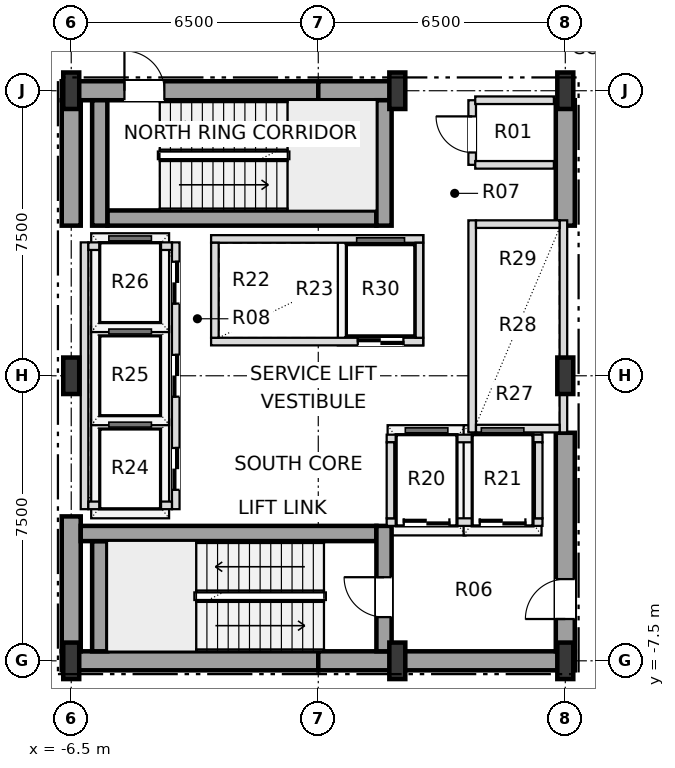
"""IFC4 building model, lengths in metres.
Left out: names, types, materials, properties, quantities, classifications, styles, units other than length and angle.
Written with IfcOpenShell. Run it as: python <this file> out.ifc"""

import sys

from ifc_helpers import new_model, si_unit, direction, frame, frame_2d, origin, origin_2d, place, context, subcontext, project, spatial, rectangle, i_section, extrude, element, fill, save


model = new_model("IFC4")
c1 = context("Model", 3, precision=1e-05, world=origin(), true_north=direction((0.0, 1.0)))
c2 = subcontext(c1, "Body", "Model", "MODEL_VIEW")
j1 = project(units=[si_unit("LENGTHUNIT", "METRE"), si_unit("PLANEANGLEUNIT", "RADIAN")], contexts=[c1])
p1 = place(None, origin())
s1 = spatial("IfcSite", under=j1, at=p1, CompositionType="ELEMENT")
p2 = place(p1, origin())
s2 = spatial("IfcBuilding", under=s1, at=p2, CompositionType="ELEMENT")
p3 = place(p2, frame((0.0, 0.0, 27.6)))
s3 = spatial("IfcBuildingStorey", under=s2, at=p3, CompositionType="ELEMENT", Elevation=27.6)
for number, where, z_axis, x_axis in (
    (1, (-6.5, -7.5, 0.0), (0.0, 0.0, 1.0), (1.0, 0.0, 0.0)),
    (2, (2.08, -7.5, 0.0), (0.0, 0.0, 1.0), (1.0, 0.0, 0.0)),
    (3, (6.5, -7.5, 0.0), (0.0, 0.0, 1.0), (1.0, 0.0, 0.0)),
    (4, (-6.5, 0.0, 0.0), (0.0, 0.0, 1.0), (1.0, 0.0, 0.0)),
    (5, (6.5, 0.0, 0.0), (0.0, 0.0, 1.0), (1.0, 0.0, 0.0)),
    (6, (-6.5, 7.5, 0.0), (0.0, 0.0, 1.0), (1.0, 0.0, 0.0)),
    (7, (2.08, 7.5, 0.0), (0.0, 0.0, 1.0), (1.0, 0.0, 0.0)),
    (8, (6.5, 7.5, 0.0), (0.0, 0.0, 1.0), (1.0, 0.0, 0.0)),
):
    element("IfcColumn", number, at=place(p3, frame(where, z_axis=z_axis, x_axis=x_axis)), inside=s3, PredefinedType="COLUMN", context=c2, shape_type="SweptSolid", body=[
        extrude(i_section(OverallWidth=0.42, OverallDepth=0.96, WebThickness=0.022, FlangeThickness=0.034, at=origin_2d()), origin(), (0.0, 0.0, 1.0), 4.8),
    ])
for number, where, z_axis, x_axis in (
    (9, (-6.75, -7.5, 0.0), (0.0, 0.0, 1.0), (1.0, 0.0, 0.0)),
    (10, (0.0, -7.5, 0.0), (0.0, 0.0, 1.0), (1.0, 0.0, 0.0)),
):
    element("IfcWall", number, at=place(p3, frame(where, z_axis=z_axis, x_axis=x_axis)), inside=s3, PredefinedType="SHEAR", context=c2, shape_type="SweptSolid", body=[
        extrude(rectangle(XDim=6.75, YDim=0.5, at=frame_2d((3.375, 0.0))), origin(), (0.0, 0.0, 1.0), 4.58),
    ])
p4 = place(p3, frame((-6.75, 7.5, 0.0), z_axis=(0.0, 0.0, 1.0), x_axis=(1.0, 0.0, 0.0)))
e11 = element("IfcWall", 11, at=p4, inside=s3, PredefinedType="SHEAR", context=c2, shape_type="SweptSolid", body=[
    extrude(rectangle(XDim=6.75, YDim=0.5, at=frame_2d((3.375, 0.0))), origin(), (0.0, 0.0, 1.0), 4.58),
])
p5 = place(p4, frame((1.65, 0.0, 0.0)))
e12 = element("IfcOpeningElement", 12, at=p5, cuts=e11, PredefinedType="OPENING", context=c2, shape_type="SweptSolid", body=[
    extrude(rectangle(XDim=1.05, YDim=2.15, at=frame_2d((0.525, 1.075))), frame((0.0, 0.26, 0.0), z_axis=(0.0, -1.0, 0.0), x_axis=(1.0, 0.0, 0.0)), (0.0, 0.0, 1.0), 0.52),
])
p6 = place(p3, frame((0.0, 7.5, 0.0), z_axis=(0.0, 0.0, 1.0), x_axis=(1.0, 0.0, 0.0)))
e13 = element("IfcWall", 13, at=p6, inside=s3, PredefinedType="SHEAR", context=c2, shape_type="SweptSolid", body=[
    extrude(rectangle(XDim=2.08, YDim=0.5, at=frame_2d((1.04, 0.0))), origin(), (0.0, 0.0, 1.0), 4.58),
])
p7 = place(p3, frame((-6.5, -7.25, 0.0), z_axis=(0.0, 0.0, 1.0), x_axis=(0.0, 1.0, 0.0)))
e14 = element("IfcWall", 14, at=p7, inside=s3, PredefinedType="SHEAR", context=c2, shape_type="SweptSolid", body=[
    extrude(rectangle(XDim=3.55, YDim=0.5, at=frame_2d((1.775, 0.0))), origin(), (0.0, 0.0, 1.0), 4.58),
])
p8 = place(p3, frame((-6.5, 3.95, 0.0), z_axis=(0.0, 0.0, 1.0), x_axis=(0.0, 1.0, 0.0)))
e15 = element("IfcWall", 15, at=p8, inside=s3, PredefinedType="SHEAR", context=c2, shape_type="SweptSolid", body=[
    extrude(rectangle(XDim=3.3, YDim=0.5, at=frame_2d((1.65, 0.0))), origin(), (0.0, 0.0, 1.0), 4.58),
])
p9 = place(p3, frame((6.5, -7.25, 0.0), z_axis=(0.0, 0.0, 1.0), x_axis=(0.0, 1.0, 0.0)))
e16 = element("IfcWall", 16, at=p9, inside=s3, PredefinedType="SHEAR", context=c2, shape_type="SweptSolid", body=[
    extrude(rectangle(XDim=5.75, YDim=0.5, at=frame_2d((2.875, 0.0))), origin(), (0.0, 0.0, 1.0), 4.58),
])
p10 = place(p9, frame((0.85, 0.0, 0.0)))
e17 = element("IfcOpeningElement", 17, at=p10, cuts=e16, PredefinedType="OPENING", context=c2, shape_type="SweptSolid", body=[
    extrude(rectangle(XDim=1.05, YDim=2.15, at=frame_2d((0.525, 1.075))), frame((0.0, 0.26, 0.0), z_axis=(0.0, -1.0, 0.0), x_axis=(1.0, 0.0, 0.0)), (0.0, 0.0, 1.0), 0.52),
])
p11 = place(p3, frame((6.5, 3.95, 0.0), z_axis=(0.0, 0.0, 1.0), x_axis=(0.0, 1.0, 0.0)))
e18 = element("IfcWall", 18, at=p11, inside=s3, PredefinedType="SHEAR", context=c2, shape_type="SweptSolid", body=[
    extrude(rectangle(XDim=3.3, YDim=0.5, at=frame_2d((1.65, 0.0))), origin(), (0.0, 0.0, 1.0), 4.58),
])
p12 = place(p3, frame((-5.75, -7.25, 0.0), z_axis=(0.0, 0.0, 1.0), x_axis=(0.0, 1.0, 0.0)))
e19 = element("IfcWall", 19, at=p12, inside=s3, PredefinedType="SHEAR", context=c2, shape_type="SweptSolid", body=[
    extrude(rectangle(XDim=2.9, YDim=0.4, at=frame_2d((1.45, 0.0))), origin(), (0.0, 0.0, 1.0), 4.58),
])
p13 = place(p3, frame((-6.25, -4.15, 0.0), z_axis=(0.0, 0.0, 1.0), x_axis=(1.0, 0.0, 0.0)))
e20 = element("IfcWall", 20, at=p13, inside=s3, PredefinedType="SHEAR", context=c2, shape_type="SweptSolid", body=[
    extrude(rectangle(XDim=7.78, YDim=0.4, at=frame_2d((3.89, 0.0))), origin(), (0.0, 0.0, 1.0), 4.58),
])
p14 = place(p3, frame((1.73, -7.25, 0.0), z_axis=(0.0, 0.0, 1.0), x_axis=(0.0, 1.0, 0.0)))
e21 = element("IfcWall", 21, at=p14, inside=s3, PredefinedType="SHEAR", context=c2, shape_type="SweptSolid", body=[
    extrude(rectangle(XDim=3.3, YDim=0.4, at=frame_2d((1.65, 0.0))), origin(), (0.0, 0.0, 1.0), 4.58),
])
p15 = place(p14, frame((0.9, 0.0, 0.0)))
e22 = element("IfcOpeningElement", 22, at=p15, cuts=e21, PredefinedType="OPENING", context=c2, shape_type="SweptSolid", body=[
    extrude(rectangle(XDim=1.05, YDim=2.15, at=frame_2d((0.525, 1.075))), frame((0.0, 0.21, 0.0), z_axis=(0.0, -1.0, 0.0), x_axis=(1.0, 0.0, 0.0)), (0.0, 0.0, 1.0), 0.42),
])
p16 = place(p3, frame((-5.55, 4.15, 0.0), z_axis=(0.0, 0.0, 1.0), x_axis=(1.0, 0.0, 0.0)))
e23 = element("IfcWall", 23, at=p16, inside=s3, PredefinedType="SHEAR", context=c2, shape_type="SweptSolid", body=[
    extrude(rectangle(XDim=7.08, YDim=0.4, at=frame_2d((3.54, 0.0))), origin(), (0.0, 0.0, 1.0), 4.58),
])
for number, where, z_axis, x_axis in (
    (24, (1.73, 3.95, 0.0), (0.0, 0.0, 1.0), (0.0, 1.0, 0.0)),
    (25, (-5.75, 3.95, 0.0), (0.0, 0.0, 1.0), (0.0, 1.0, 0.0)),
):
    element("IfcWall", number, at=place(p3, frame(where, z_axis=z_axis, x_axis=x_axis)), inside=s3, PredefinedType="SHEAR", context=c2, shape_type="SweptSolid", body=[
        extrude(rectangle(XDim=3.3, YDim=0.4, at=frame_2d((1.65, 0.0))), origin(), (0.0, 0.0, 1.0), 4.58),
    ])
p17 = place(p3, frame((-3.75, -3.51, 0.0), z_axis=(0.0, 0.0, 1.0), x_axis=(0.0, 1.0, 0.0)))
e26 = element("IfcWall", 26, at=p17, inside=s3, PredefinedType="SOLIDWALL", context=c2, shape_type="SweptSolid", body=[
    extrude(rectangle(XDim=7.02, YDim=0.2, at=frame_2d((3.51, 0.0))), origin(), (0.0, 0.0, 1.0), 4.58),
])
p18 = place(p17, frame((0.51, 0.0, 0.0)))
e27 = element("IfcOpeningElement", 27, at=p18, cuts=e26, PredefinedType="OPENING", context=c2, shape_type="SweptSolid", body=[
    extrude(rectangle(XDim=1.1, YDim=2.15, at=frame_2d((0.55, 1.075))), frame((0.0, 0.11, 0.0), z_axis=(0.0, -1.0, 0.0), x_axis=(1.0, 0.0, 0.0)), (0.0, 0.0, 1.0), 0.22),
])
p19 = place(p17, frame((2.96, 0.0, 0.0)))
e28 = element("IfcOpeningElement", 28, at=p19, cuts=e26, PredefinedType="OPENING", context=c2, shape_type="SweptSolid", body=[
    extrude(rectangle(XDim=1.1, YDim=2.15, at=frame_2d((0.55, 1.075))), frame((0.0, 0.11, 0.0), z_axis=(0.0, -1.0, 0.0), x_axis=(1.0, 0.0, 0.0)), (0.0, 0.0, 1.0), 0.22),
])
p20 = place(p17, frame((5.41, 0.0, 0.0)))
e29 = element("IfcOpeningElement", 29, at=p20, cuts=e26, PredefinedType="OPENING", context=c2, shape_type="SweptSolid", body=[
    extrude(rectangle(XDim=1.1, YDim=2.15, at=frame_2d((0.55, 1.075))), frame((0.0, 0.11, 0.0), z_axis=(0.0, -1.0, 0.0), x_axis=(1.0, 0.0, 0.0)), (0.0, 0.0, 1.0), 0.22),
])
p21 = place(p3, frame((-6.15, -3.51, 0.0), z_axis=(0.0, 0.0, 1.0), x_axis=(0.0, 1.0, 0.0)))
e30 = element("IfcWall", 30, at=p21, inside=s3, PredefinedType="SOLIDWALL", context=c2, shape_type="SweptSolid", body=[
    extrude(rectangle(XDim=7.02, YDim=0.2, at=frame_2d((3.51, 0.0))), origin(), (0.0, 0.0, 1.0), 4.58),
])
for number, where, z_axis, x_axis in (
    (31, (-6.05, -3.41, 0.0), (0.0, 0.0, 1.0), (1.0, 0.0, 0.0)),
    (32, (-6.05, 3.41, 0.0), (0.0, 0.0, 1.0), (1.0, 0.0, 0.0)),
):
    element("IfcWall", number, at=place(p3, frame(where, z_axis=z_axis, x_axis=x_axis)), inside=s3, PredefinedType="SOLIDWALL", context=c2, shape_type="SweptSolid", body=[
        extrude(rectangle(XDim=2.2, YDim=0.2, at=frame_2d((1.1, 0.0))), origin(), (0.0, 0.0, 1.0), 4.58),
    ])
p22 = place(p3, frame((4.05, -1.49, 0.0), z_axis=(0.0, 0.0, 1.0), x_axis=(0.0, 1.0, 0.0)))
e33 = element("IfcWall", 33, at=p22, inside=s3, PredefinedType="SOLIDWALL", context=c2, shape_type="SweptSolid", body=[
    extrude(rectangle(XDim=5.58, YDim=0.2, at=frame_2d((2.79, 0.0))), origin(), (0.0, 0.0, 1.0), 4.58),
])
p23 = place(p3, frame((6.45, -1.49, 0.0), z_axis=(0.0, 0.0, 1.0), x_axis=(0.0, 1.0, 0.0)))
e34 = element("IfcWall", 34, at=p23, inside=s3, PredefinedType="SOLIDWALL", context=c2, shape_type="SweptSolid", body=[
    extrude(rectangle(XDim=5.58, YDim=0.2, at=frame_2d((2.79, 0.0))), origin(), (0.0, 0.0, 1.0), 4.016),
])
for number, where, z_axis, x_axis in (
    (35, (4.15, -1.39, 0.0), (0.0, 0.0, 1.0), (1.0, 0.0, 0.0)),
    (36, (4.15, 3.99, 0.0), (0.0, 0.0, 1.0), (1.0, 0.0, 0.0)),
):
    element("IfcWall", number, at=place(p3, frame(where, z_axis=z_axis, x_axis=x_axis)), inside=s3, PredefinedType="SOLIDWALL", context=c2, shape_type="SweptSolid", body=[
        extrude(rectangle(XDim=2.2, YDim=0.2, at=frame_2d((1.1, 0.0))), origin(), (0.0, 0.0, 1.0), 4.58),
    ])
p24 = place(p3, frame((-2.82, 0.9, 0.0), z_axis=(0.0, 0.0, 1.0), x_axis=(1.0, 0.0, 0.0)))
e37 = element("IfcWall", 37, at=p24, inside=s3, PredefinedType="SOLIDWALL", context=c2, shape_type="SweptSolid", body=[
    extrude(rectangle(XDim=5.58, YDim=0.2, at=frame_2d((2.79, 0.0))), origin(), (0.0, 0.0, 1.0), 4.58),
])
p25 = place(p24, frame((3.86, 0.0, 0.0)))
e38 = element("IfcOpeningElement", 38, at=p25, cuts=e37, PredefinedType="OPENING", context=c2, shape_type="SweptSolid", body=[
    extrude(rectangle(XDim=1.2, YDim=2.2, at=frame_2d((0.6, 1.1))), frame((0.0, 0.11, 0.0), z_axis=(0.0, -1.0, 0.0), x_axis=(1.0, 0.0, 0.0)), (0.0, 0.0, 1.0), 0.22),
])
p26 = place(p3, frame((-2.82, 3.6, 0.0), z_axis=(0.0, 0.0, 1.0), x_axis=(1.0, 0.0, 0.0)))
e39 = element("IfcWall", 39, at=p26, inside=s3, PredefinedType="SOLIDWALL", context=c2, shape_type="SweptSolid", body=[
    extrude(rectangle(XDim=5.58, YDim=0.2, at=frame_2d((2.79, 0.0))), origin(), (0.0, 0.0, 1.0), 4.58),
])
for number, where, z_axis, x_axis in (
    (40, (-2.72, 1.0, 0.0), (0.0, 0.0, 1.0), (0.0, 1.0, 0.0)),
    (41, (2.66, 1.0, 0.0), (0.0, 0.0, 1.0), (0.0, 1.0, 0.0)),
):
    element("IfcWall", number, at=place(p3, frame(where, z_axis=z_axis, x_axis=x_axis)), inside=s3, PredefinedType="SOLIDWALL", context=c2, shape_type="SweptSolid", body=[
        extrude(rectangle(XDim=2.5, YDim=0.2, at=frame_2d((1.25, 0.0))), origin(), (0.0, 0.0, 1.0), 4.58),
    ])
p27 = place(p3, frame((1.8, -3.85, 0.0), z_axis=(0.0, 0.0, 1.0), x_axis=(1.0, 0.0, 0.0)))
e42 = element("IfcWall", 42, at=p27, inside=s3, PredefinedType="SOLIDWALL", context=c2, shape_type="SweptSolid", body=[
    extrude(rectangle(XDim=4.1, YDim=0.2, at=frame_2d((2.05, 0.0))), origin(), (0.0, 0.0, 1.0), 4.58),
])
p28 = place(p27, frame((0.45, 0.0, 0.0)))
e43 = element("IfcOpeningElement", 43, at=p28, cuts=e42, PredefinedType="OPENING", context=c2, shape_type="SweptSolid", body=[
    extrude(rectangle(XDim=1.2, YDim=2.2, at=frame_2d((0.6, 1.1))), frame((0.0, 0.11, 0.0), z_axis=(0.0, -1.0, 0.0), x_axis=(1.0, 0.0, 0.0)), (0.0, 0.0, 1.0), 0.22),
])
p29 = place(p27, frame((2.45, 0.0, 0.0)))
e44 = element("IfcOpeningElement", 44, at=p29, cuts=e42, PredefinedType="OPENING", context=c2, shape_type="SweptSolid", body=[
    extrude(rectangle(XDim=1.2, YDim=2.2, at=frame_2d((0.6, 1.1))), frame((0.0, 0.11, 0.0), z_axis=(0.0, -1.0, 0.0), x_axis=(1.0, 0.0, 0.0)), (0.0, 0.0, 1.0), 0.22),
])
p30 = place(p3, frame((1.8, -1.65, 0.0), z_axis=(0.0, 0.0, 1.0), x_axis=(1.0, 0.0, 0.0)))
e45 = element("IfcWall", 45, at=p30, inside=s3, PredefinedType="SOLIDWALL", context=c2, shape_type="SweptSolid", body=[
    extrude(rectangle(XDim=4.1, YDim=0.2, at=frame_2d((2.05, 0.0))), origin(), (0.0, 0.0, 1.0), 4.58),
])
for number, where, z_axis, x_axis in (
    (46, (1.9, -3.75, 0.0), (0.0, 0.0, 1.0), (0.0, 1.0, 0.0)),
    (47, (5.8, -3.75, 0.0), (0.0, 0.0, 1.0), (0.0, 1.0, 0.0)),
):
    element("IfcWall", number, at=place(p3, frame(where, z_axis=z_axis, x_axis=x_axis)), inside=s3, PredefinedType="SOLIDWALL", context=c2, shape_type="SweptSolid", body=[
        extrude(rectangle(XDim=2.0, YDim=0.2, at=frame_2d((1.0, 0.0))), origin(), (0.0, 0.0, 1.0), 4.58),
    ])
p31 = place(p3, frame((4.05, 5.55, 0.0), z_axis=(0.0, 0.0, 1.0), x_axis=(0.0, 1.0, 0.0)))
e48 = element("IfcWall", 48, at=p31, inside=s3, PredefinedType="SOLIDWALL", context=c2, shape_type="SweptSolid", body=[
    extrude(rectangle(XDim=1.7, YDim=0.2, at=frame_2d((0.85, 0.0))), origin(), (0.0, 0.0, 1.0), 4.58),
])
p32 = place(p31, frame((0.325, 0.0, 0.0)))
e49 = element("IfcOpeningElement", 49, at=p32, cuts=e48, PredefinedType="OPENING", context=c2, shape_type="SweptSolid", body=[
    extrude(rectangle(XDim=0.95, YDim=2.15, at=frame_2d((0.475, 1.075))), frame((0.0, 0.11, 0.0), z_axis=(0.0, -1.0, 0.0), x_axis=(1.0, 0.0, 0.0)), (0.0, 0.0, 1.0), 0.22),
])
for number, where, z_axis, x_axis in (
    (50, (4.13, 5.55, 0.0), (0.0, 0.0, 1.0), (1.0, 0.0, 0.0)),
    (51, (4.13, 7.25, 0.0), (0.0, 0.0, 1.0), (1.0, 0.0, 0.0)),
):
    element("IfcWall", number, at=place(p3, frame(where, z_axis=z_axis, x_axis=x_axis)), inside=s3, PredefinedType="SOLIDWALL", context=c2, shape_type="SweptSolid", body=[
        extrude(rectangle(XDim=2.07, YDim=0.2, at=frame_2d((1.035, 0.0))), origin(), (0.0, 0.0, 1.0), 4.58),
    ])
p33 = place(p10, origin())
e52 = element("IfcDoor", 52, at=p33, inside=s3, OperationType="SINGLE_SWING_LEFT", PredefinedType="DOOR", context=c2, shape_type="SweptSolid", body=[
    extrude(rectangle(XDim=1.05, YDim=2.15, at=frame_2d((0.525, 1.075))), frame((0.0, 0.025, 0.0), z_axis=(0.0, -1.0, 0.0), x_axis=(1.0, 0.0, 0.0)), (0.0, 0.0, 1.0), 0.05),
])
fill(e17, e52)
p34 = place(p15, origin())
e53 = element("IfcDoor", 53, at=p34, inside=s3, OperationType="SINGLE_SWING_RIGHT", PredefinedType="DOOR", context=c2, shape_type="SweptSolid", body=[
    extrude(rectangle(XDim=1.05, YDim=2.15, at=frame_2d((0.525, 1.075))), frame((0.0, 0.025, 0.0), z_axis=(0.0, -1.0, 0.0), x_axis=(1.0, 0.0, 0.0)), (0.0, 0.0, 1.0), 0.05),
])
fill(e22, e53)
p35 = place(p5, origin())
e54 = element("IfcDoor", 54, at=p35, inside=s3, OperationType="SINGLE_SWING_LEFT", PredefinedType="DOOR", context=c2, shape_type="SweptSolid", body=[
    extrude(rectangle(XDim=1.05, YDim=2.15, at=frame_2d((0.525, 1.075))), frame((0.0, 0.025, 0.0), z_axis=(0.0, -1.0, 0.0), x_axis=(1.0, 0.0, 0.0)), (0.0, 0.0, 1.0), 0.05),
])
fill(e12, e54)
p36 = place(p18, origin())
e55 = element("IfcDoor", 55, at=p36, inside=s3, OperationType="DOUBLE_DOOR_SLIDING", PredefinedType="DOOR", context=c2, shape_type="SweptSolid", body=[
    extrude(rectangle(XDim=1.1, YDim=2.15, at=frame_2d((0.55, 1.075))), frame((0.0, 0.025, 0.0), z_axis=(0.0, -1.0, 0.0), x_axis=(1.0, 0.0, 0.0)), (0.0, 0.0, 1.0), 0.05),
])
fill(e27, e55)
p37 = place(p19, origin())
e56 = element("IfcDoor", 56, at=p37, inside=s3, OperationType="DOUBLE_DOOR_SLIDING", PredefinedType="DOOR", context=c2, shape_type="SweptSolid", body=[
    extrude(rectangle(XDim=1.1, YDim=2.15, at=frame_2d((0.55, 1.075))), frame((0.0, 0.025, 0.0), z_axis=(0.0, -1.0, 0.0), x_axis=(1.0, 0.0, 0.0)), (0.0, 0.0, 1.0), 0.05),
])
fill(e28, e56)
p38 = place(p20, origin())
e57 = element("IfcDoor", 57, at=p38, inside=s3, OperationType="DOUBLE_DOOR_SLIDING", PredefinedType="DOOR", context=c2, shape_type="SweptSolid", body=[
    extrude(rectangle(XDim=1.1, YDim=2.15, at=frame_2d((0.55, 1.075))), frame((0.0, 0.025, 0.0), z_axis=(0.0, -1.0, 0.0), x_axis=(1.0, 0.0, 0.0)), (0.0, 0.0, 1.0), 0.05),
])
fill(e29, e57)
p39 = place(p25, origin())
e58 = element("IfcDoor", 58, at=p39, inside=s3, OperationType="DOUBLE_DOOR_SLIDING", PredefinedType="DOOR", context=c2, shape_type="SweptSolid", body=[
    extrude(rectangle(XDim=1.2, YDim=2.2, at=frame_2d((0.6, 1.1))), frame((0.0, 0.025, 0.0), z_axis=(0.0, -1.0, 0.0), x_axis=(1.0, 0.0, 0.0)), (0.0, 0.0, 1.0), 0.05),
])
fill(e38, e58)
p40 = place(p28, origin())
e59 = element("IfcDoor", 59, at=p40, inside=s3, OperationType="DOUBLE_DOOR_SLIDING", PredefinedType="DOOR", context=c2, shape_type="SweptSolid", body=[
    extrude(rectangle(XDim=1.2, YDim=2.2, at=frame_2d((0.6, 1.1))), frame((0.0, 0.025, 0.0), z_axis=(0.0, -1.0, 0.0), x_axis=(1.0, 0.0, 0.0)), (0.0, 0.0, 1.0), 0.05),
])
fill(e43, e59)
p41 = place(p29, origin())
e60 = element("IfcDoor", 60, at=p41, inside=s3, OperationType="DOUBLE_DOOR_SLIDING", PredefinedType="DOOR", context=c2, shape_type="SweptSolid", body=[
    extrude(rectangle(XDim=1.2, YDim=2.2, at=frame_2d((0.6, 1.1))), frame((0.0, 0.025, 0.0), z_axis=(0.0, -1.0, 0.0), x_axis=(1.0, 0.0, 0.0)), (0.0, 0.0, 1.0), 0.05),
])
fill(e44, e60)
p42 = place(p32, origin())
e61 = element("IfcDoor", 61, at=p42, inside=s3, OperationType="SINGLE_SWING_RIGHT", PredefinedType="DOOR", context=c2, shape_type="SweptSolid", body=[
    extrude(rectangle(XDim=0.95, YDim=2.15, at=frame_2d((0.475, 1.075))), frame((0.0, 0.025, 0.0), z_axis=(0.0, -1.0, 0.0), x_axis=(1.0, 0.0, 0.0)), (0.0, 0.0, 1.0), 0.05),
])
fill(e49, e61)
save(model, sys.argv[1])
